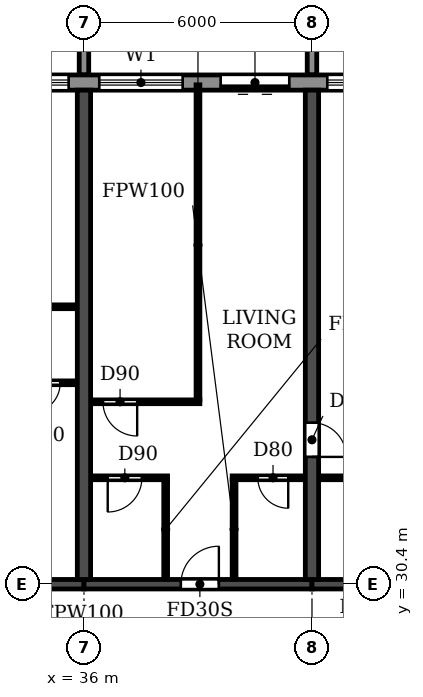
"""IFC4 building model, lengths in metres.
Left out: names, types, materials, properties, quantities, classifications, styles, units other than length and angle.
Written with IfcOpenShell. Run it as: python <this file> out.ifc"""

import sys

from ifc_helpers import new_model, si_unit, direction, frame, frame_2d, origin, place, context, subcontext, project, spatial, polyline, rectangle, outline, extrude, source, transform, mapped, element, fill, save


model = new_model("IFC4")
c1 = context("Model", 3, precision=1e-05, world=origin(), true_north=direction((0.0, 1.0)))
c2 = subcontext(c1, "Body", "Model", "MODEL_VIEW")
j1 = project(units=[si_unit("LENGTHUNIT", "METRE"), si_unit("PLANEANGLEUNIT", "RADIAN")], contexts=[c1])
p1 = place(None, origin())
s1 = spatial("IfcSite", under=j1, at=p1, CompositionType="ELEMENT")
p2 = place(p1, origin())
s2 = spatial("IfcBuilding", under=s1, at=p2, CompositionType="ELEMENT")
p3 = place(p2, frame((0.0, 0.0, 109.2)))
s3 = spatial("IfcBuildingStorey", under=s2, at=p3, CompositionType="ELEMENT", Elevation=109.2)
p4 = place(p3, frame((36.0, 30.525, 0.0), z_axis=(0.0, 0.0, 1.0), x_axis=(0.0, 1.0, 0.0)))
e1 = element("IfcWall", 1, at=p4, inside=s3, PredefinedType="SHEAR", context=c2, shape_type="SweptSolid", body=[
    extrude(rectangle(XDim=12.875, YDim=0.35, at=frame_2d((6.438, 0.0))), origin(), (0.0, 0.0, 1.0), 3.06),
])
p5 = place(p3, frame((42.0, 30.525, 0.0), z_axis=(0.0, 0.0, 1.0), x_axis=(0.0, 1.0, 0.0)))
e2 = element("IfcWall", 2, at=p5, inside=s3, PredefinedType="SHEAR", context=c2, shape_type="SweptSolid", body=[
    extrude(rectangle(XDim=12.875, YDim=0.35, at=frame_2d((6.438, 0.0))), origin(), (0.0, 0.0, 1.0), 3.06),
])
p6 = place(p5, frame((3.225, 0.0, 0.0)))
e3 = element("IfcOpeningElement", 3, at=p6, cuts=e2, PredefinedType="OPENING", context=c2, shape_type="SweptSolid", body=[
    extrude(rectangle(XDim=0.9, YDim=2.1, at=frame_2d((0.45, 1.05))), frame((0.0, 0.185, 0.0), z_axis=(0.0, -1.0, 0.0), x_axis=(1.0, 0.0, 0.0)), (0.0, 0.0, 1.0), 0.37),
])
p7 = place(p3, frame((30.0, 30.4, 0.0), z_axis=(0.0, 0.0, 1.0), x_axis=(1.0, 0.0, 0.0)))
e4 = element("IfcWall", 4, at=p7, inside=s3, PredefinedType="SHEAR", context=c2, shape_type="SweptSolid", body=[
    extrude(rectangle(XDim=6.0, YDim=0.25, at=frame_2d((3.0, 0.0))), origin(), (0.0, 0.0, 1.0), 2.46),
])
p8 = place(p7, frame((2.55, 0.0, 0.0)))
e5 = element("IfcOpeningElement", 5, at=p8, cuts=e4, PredefinedType="OPENING", context=c2, shape_type="SweptSolid", body=[
    extrude(rectangle(XDim=1.0, YDim=2.1, at=frame_2d((0.5, 1.05))), frame((0.0, 0.135, 0.0), z_axis=(0.0, -1.0, 0.0), x_axis=(1.0, 0.0, 0.0)), (0.0, 0.0, 1.0), 0.27),
])
p9 = place(p3, frame((36.0, 30.4, 0.0), z_axis=(0.0, 0.0, 1.0), x_axis=(1.0, 0.0, 0.0)))
e6 = element("IfcWall", 6, at=p9, inside=s3, PredefinedType="SHEAR", context=c2, shape_type="SweptSolid", body=[
    extrude(rectangle(XDim=6.0, YDim=0.25, at=frame_2d((3.0, 0.0))), origin(), (0.0, 0.0, 1.0), 2.46),
])
p10 = place(p9, frame((2.55, 0.0, 0.0)))
e7 = element("IfcOpeningElement", 7, at=p10, cuts=e6, PredefinedType="OPENING", context=c2, shape_type="SweptSolid", body=[
    extrude(rectangle(XDim=1.0, YDim=2.1, at=frame_2d((0.5, 1.05))), frame((0.0, 0.135, 0.0), z_axis=(0.0, -1.0, 0.0), x_axis=(1.0, 0.0, 0.0)), (0.0, 0.0, 1.0), 0.27),
])
p11 = place(p3, frame((42.0, 30.4, 0.0), z_axis=(0.0, 0.0, 1.0), x_axis=(1.0, 0.0, 0.0)))
e8 = element("IfcWall", 8, at=p11, inside=s3, PredefinedType="SHEAR", context=c2, shape_type="SweptSolid", body=[
    extrude(rectangle(XDim=6.0, YDim=0.25, at=frame_2d((3.0, 0.0))), origin(), (0.0, 0.0, 1.0), 2.46),
])
p12 = place(p3, frame((85.317, 43.6, 0.0), z_axis=(0.0, 0.0, 1.0), x_axis=(-1.0, 0.0, 0.0)))
e9 = element("IfcWall", 9, at=p12, inside=s3, PredefinedType="STANDARD", context=c2, shape_type="SweptSolid", body=[
    extrude(rectangle(XDim=68.634, YDim=0.4, at=frame_2d((34.317, 0.0))), origin(), (0.0, 0.0, 1.0), 3.06),
])
p13 = place(p12, frame((64.917, 0.0, 0.0)))
e10 = element("IfcOpeningElement", 10, at=p13, cuts=e9, PredefinedType="OPENING", context=c2, shape_type="SweptSolid", body=[
    extrude(rectangle(XDim=1.8, YDim=2.4, at=frame_2d((0.9, 1.2))), frame((0.0, 0.21, 0.0), z_axis=(0.0, -1.0, 0.0), x_axis=(1.0, 0.0, 0.0)), (0.0, 0.0, 1.0), 0.42),
])
p14 = place(p12, frame((61.717, 0.0, 0.9)))
e11 = element("IfcOpeningElement", 11, at=p14, cuts=e9, PredefinedType="OPENING", context=c2, shape_type="SweptSolid", body=[
    extrude(rectangle(XDim=2.2, YDim=1.5, at=frame_2d((1.1, 0.75))), frame((0.0, 0.21, 0.0), z_axis=(0.0, -1.0, 0.0), x_axis=(1.0, 0.0, 0.0)), (0.0, 0.0, 1.0), 0.42),
])
p15 = place(p12, frame((58.717, 0.0, 0.9)))
e12 = element("IfcOpeningElement", 12, at=p15, cuts=e9, PredefinedType="OPENING", context=c2, shape_type="SweptSolid", body=[
    extrude(rectangle(XDim=2.2, YDim=1.5, at=frame_2d((1.1, 0.75))), frame((0.0, 0.21, 0.0), z_axis=(0.0, -1.0, 0.0), x_axis=(1.0, 0.0, 0.0)), (0.0, 0.0, 1.0), 0.42),
])
p16 = place(p12, frame((55.917, 0.0, 0.0)))
e13 = element("IfcOpeningElement", 13, at=p16, cuts=e9, PredefinedType="OPENING", context=c2, shape_type="SweptSolid", body=[
    extrude(rectangle(XDim=1.8, YDim=2.4, at=frame_2d((0.9, 1.2))), frame((0.0, 0.21, 0.0), z_axis=(0.0, -1.0, 0.0), x_axis=(1.0, 0.0, 0.0)), (0.0, 0.0, 1.0), 0.42),
])
p17 = place(p12, frame((52.917, 0.0, 0.0)))
e14 = element("IfcOpeningElement", 14, at=p17, cuts=e9, PredefinedType="OPENING", context=c2, shape_type="SweptSolid", body=[
    extrude(rectangle(XDim=1.8, YDim=2.4, at=frame_2d((0.9, 1.2))), frame((0.0, 0.21, 0.0), z_axis=(0.0, -1.0, 0.0), x_axis=(1.0, 0.0, 0.0)), (0.0, 0.0, 1.0), 0.42),
])
p18 = place(p12, frame((49.717, 0.0, 0.9)))
e15 = element("IfcOpeningElement", 15, at=p18, cuts=e9, PredefinedType="OPENING", context=c2, shape_type="SweptSolid", body=[
    extrude(rectangle(XDim=2.2, YDim=1.5, at=frame_2d((1.1, 0.75))), frame((0.0, 0.21, 0.0), z_axis=(0.0, -1.0, 0.0), x_axis=(1.0, 0.0, 0.0)), (0.0, 0.0, 1.0), 0.42),
])
p19 = place(p12, frame((46.717, 0.0, 0.9)))
e16 = element("IfcOpeningElement", 16, at=p19, cuts=e9, PredefinedType="OPENING", context=c2, shape_type="SweptSolid", body=[
    extrude(rectangle(XDim=2.2, YDim=1.5, at=frame_2d((1.1, 0.75))), frame((0.0, 0.21, 0.0), z_axis=(0.0, -1.0, 0.0), x_axis=(1.0, 0.0, 0.0)), (0.0, 0.0, 1.0), 0.42),
])
p20 = place(p12, frame((43.917, 0.0, 0.0)))
e17 = element("IfcOpeningElement", 17, at=p20, cuts=e9, PredefinedType="OPENING", context=c2, shape_type="SweptSolid", body=[
    extrude(rectangle(XDim=1.8, YDim=2.4, at=frame_2d((0.9, 1.2))), frame((0.0, 0.21, 0.0), z_axis=(0.0, -1.0, 0.0), x_axis=(1.0, 0.0, 0.0)), (0.0, 0.0, 1.0), 0.42),
])
p21 = place(p12, frame((40.717, 0.0, 0.9)))
e18 = element("IfcOpeningElement", 18, at=p21, cuts=e9, PredefinedType="OPENING", context=c2, shape_type="SweptSolid", body=[
    extrude(rectangle(XDim=2.2, YDim=1.5, at=frame_2d((1.1, 0.75))), frame((0.0, 0.21, 0.0), z_axis=(0.0, -1.0, 0.0), x_axis=(1.0, 0.0, 0.0)), (0.0, 0.0, 1.0), 0.42),
])
p22 = place(p12, frame((37.717, 0.0, 0.9)))
e19 = element("IfcOpeningElement", 19, at=p22, cuts=e9, PredefinedType="OPENING", context=c2, shape_type="SweptSolid", body=[
    extrude(rectangle(XDim=2.2, YDim=1.5, at=frame_2d((1.1, 0.75))), frame((0.0, 0.21, 0.0), z_axis=(0.0, -1.0, 0.0), x_axis=(1.0, 0.0, 0.0)), (0.0, 0.0, 1.0), 0.42),
])
p23 = place(p12, frame((34.917, 0.0, 0.0)))
e20 = element("IfcOpeningElement", 20, at=p23, cuts=e9, PredefinedType="OPENING", context=c2, shape_type="SweptSolid", body=[
    extrude(rectangle(XDim=1.8, YDim=2.4, at=frame_2d((0.9, 1.2))), frame((0.0, 0.21, 0.0), z_axis=(0.0, -1.0, 0.0), x_axis=(1.0, 0.0, 0.0)), (0.0, 0.0, 1.0), 0.42),
])
p24 = place(p12, frame((31.717, 0.0, 0.9)))
e21 = element("IfcOpeningElement", 21, at=p24, cuts=e9, PredefinedType="OPENING", context=c2, shape_type="SweptSolid", body=[
    extrude(rectangle(XDim=2.2, YDim=1.5, at=frame_2d((1.1, 0.75))), frame((0.0, 0.21, 0.0), z_axis=(0.0, -1.0, 0.0), x_axis=(1.0, 0.0, 0.0)), (0.0, 0.0, 1.0), 0.42),
])
p25 = place(p12, frame((28.917, 0.0, 0.0)))
e22 = element("IfcOpeningElement", 22, at=p25, cuts=e9, PredefinedType="OPENING", context=c2, shape_type="SweptSolid", body=[
    extrude(rectangle(XDim=1.8, YDim=2.4, at=frame_2d((0.9, 1.2))), frame((0.0, 0.21, 0.0), z_axis=(0.0, -1.0, 0.0), x_axis=(1.0, 0.0, 0.0)), (0.0, 0.0, 1.0), 0.42),
])
p26 = place(p12, frame((25.717, 0.0, 0.9)))
e23 = element("IfcOpeningElement", 23, at=p26, cuts=e9, PredefinedType="OPENING", context=c2, shape_type="SweptSolid", body=[
    extrude(rectangle(XDim=2.2, YDim=1.5, at=frame_2d((1.1, 0.75))), frame((0.0, 0.21, 0.0), z_axis=(0.0, -1.0, 0.0), x_axis=(1.0, 0.0, 0.0)), (0.0, 0.0, 1.0), 0.42),
])
p27 = place(p12, frame((22.717, 0.0, 0.9)))
e24 = element("IfcOpeningElement", 24, at=p27, cuts=e9, PredefinedType="OPENING", context=c2, shape_type="SweptSolid", body=[
    extrude(rectangle(XDim=2.2, YDim=1.5, at=frame_2d((1.1, 0.75))), frame((0.0, 0.21, 0.0), z_axis=(0.0, -1.0, 0.0), x_axis=(1.0, 0.0, 0.0)), (0.0, 0.0, 1.0), 0.42),
])
p28 = place(p12, frame((19.917, 0.0, 0.0)))
e25 = element("IfcOpeningElement", 25, at=p28, cuts=e9, PredefinedType="OPENING", context=c2, shape_type="SweptSolid", body=[
    extrude(rectangle(XDim=1.8, YDim=2.4, at=frame_2d((0.9, 1.2))), frame((0.0, 0.21, 0.0), z_axis=(0.0, -1.0, 0.0), x_axis=(1.0, 0.0, 0.0)), (0.0, 0.0, 1.0), 0.42),
])
p29 = place(p12, frame((16.717, 0.0, 0.9)))
e26 = element("IfcOpeningElement", 26, at=p29, cuts=e9, PredefinedType="OPENING", context=c2, shape_type="SweptSolid", body=[
    extrude(rectangle(XDim=2.2, YDim=1.5, at=frame_2d((1.1, 0.75))), frame((0.0, 0.21, 0.0), z_axis=(0.0, -1.0, 0.0), x_axis=(1.0, 0.0, 0.0)), (0.0, 0.0, 1.0), 0.42),
])
p30 = place(p12, frame((13.917, 0.0, 0.0)))
e27 = element("IfcOpeningElement", 27, at=p30, cuts=e9, PredefinedType="OPENING", context=c2, shape_type="SweptSolid", body=[
    extrude(rectangle(XDim=1.8, YDim=2.4, at=frame_2d((0.9, 1.2))), frame((0.0, 0.21, 0.0), z_axis=(0.0, -1.0, 0.0), x_axis=(1.0, 0.0, 0.0)), (0.0, 0.0, 1.0), 0.42),
])
p31 = place(p12, frame((10.717, 0.0, 0.9)))
e28 = element("IfcOpeningElement", 28, at=p31, cuts=e9, PredefinedType="OPENING", context=c2, shape_type="SweptSolid", body=[
    extrude(rectangle(XDim=2.2, YDim=1.5, at=frame_2d((1.1, 0.75))), frame((0.0, 0.21, 0.0), z_axis=(0.0, -1.0, 0.0), x_axis=(1.0, 0.0, 0.0)), (0.0, 0.0, 1.0), 0.42),
])
p32 = place(p12, frame((7.717, 0.0, 0.9)))
e29 = element("IfcOpeningElement", 29, at=p32, cuts=e9, PredefinedType="OPENING", context=c2, shape_type="SweptSolid", body=[
    extrude(rectangle(XDim=2.2, YDim=1.5, at=frame_2d((1.1, 0.75))), frame((0.0, 0.21, 0.0), z_axis=(0.0, -1.0, 0.0), x_axis=(1.0, 0.0, 0.0)), (0.0, 0.0, 1.0), 0.42),
])
p33 = place(p12, frame((4.917, 0.0, 0.0)))
e30 = element("IfcOpeningElement", 30, at=p33, cuts=e9, PredefinedType="OPENING", context=c2, shape_type="SweptSolid", body=[
    extrude(rectangle(XDim=1.8, YDim=2.4, at=frame_2d((0.9, 1.2))), frame((0.0, 0.21, 0.0), z_axis=(0.0, -1.0, 0.0), x_axis=(1.0, 0.0, 0.0)), (0.0, 0.0, 1.0), 0.42),
])
p34 = place(p12, frame((1.717, 0.0, 0.9)))
e31 = element("IfcOpeningElement", 31, at=p34, cuts=e9, PredefinedType="OPENING", context=c2, shape_type="SweptSolid", body=[
    extrude(rectangle(XDim=2.2, YDim=1.5, at=frame_2d((1.1, 0.75))), frame((0.0, 0.21, 0.0), z_axis=(0.0, -1.0, 0.0), x_axis=(1.0, 0.0, 0.0)), (0.0, 0.0, 1.0), 0.42),
])
m1 = source(origin(), c2, "Body", "SweptSolid", [
    extrude(outline(polyline([(0.0, 0.0), (0.25, 0.0), (0.25, 3.1), (0.0, 3.1), (0.0, 0.0)])), origin(), (0.0, 0.0, 1.0), 3.1),
])
for number, where in (
    (32, (35.875, 43.8, 0.0)),
    (33, (41.875, 43.8, 0.0)),
):
    element("IfcWall", number, at=place(p3, frame(where)), inside=s3, PredefinedType="STANDARD", context=c2, shape_type="MappedRepresentation", body=[
        mapped(m1, transform((0.0, 0.0, 0.0))),
    ])
p35 = place(p3, frame((36.185, 33.2, 0.0), z_axis=(0.0, 0.0, 1.0), x_axis=(1.0, 0.0, 0.0)))
e34 = element("IfcWall", 34, at=p35, inside=s3, PredefinedType="PARTITIONING", context=c2, shape_type="SweptSolid", body=[
    extrude(rectangle(XDim=2.015, YDim=0.1, at=frame_2d((1.007, 0.0))), origin(), (0.0, 0.0, 1.0), 3.06),
])
p36 = place(p35, frame((0.44, 0.0, 0.0)))
e35 = element("IfcOpeningElement", 35, at=p36, cuts=e34, PredefinedType="OPENING", context=c2, shape_type="SweptSolid", body=[
    extrude(rectangle(XDim=0.9, YDim=2.1, at=frame_2d((0.45, 1.05))), frame((0.0, 0.06, 0.0), z_axis=(0.0, -1.0, 0.0), x_axis=(1.0, 0.0, 0.0)), (0.0, 0.0, 1.0), 0.12),
])
p37 = place(p3, frame((39.9, 33.2, 0.0), z_axis=(0.0, 0.0, 1.0), x_axis=(1.0, 0.0, 0.0)))
e36 = element("IfcWall", 36, at=p37, inside=s3, PredefinedType="PARTITIONING", context=c2, shape_type="SweptSolid", body=[
    extrude(rectangle(XDim=1.915, YDim=0.1, at=frame_2d((0.958, 0.0))), origin(), (0.0, 0.0, 1.0), 3.06),
])
p38 = place(p37, frame((0.675, 0.0, 0.0)))
e37 = element("IfcOpeningElement", 37, at=p38, cuts=e36, PredefinedType="OPENING", context=c2, shape_type="SweptSolid", body=[
    extrude(rectangle(XDim=0.8, YDim=2.1, at=frame_2d((0.4, 1.05))), frame((0.0, 0.06, 0.0), z_axis=(0.0, -1.0, 0.0), x_axis=(1.0, 0.0, 0.0)), (0.0, 0.0, 1.0), 0.12),
])
p39 = place(p3, frame((42.185, 33.2, 0.0), z_axis=(0.0, 0.0, 1.0), x_axis=(1.0, 0.0, 0.0)))
e38 = element("IfcWall", 38, at=p39, inside=s3, PredefinedType="PARTITIONING", context=c2, shape_type="SweptSolid", body=[
    extrude(rectangle(XDim=2.715, YDim=0.1, at=frame_2d((1.357, 0.0))), origin(), (0.0, 0.0, 1.0), 3.06),
])
p40 = place(p39, frame((0.915, 0.0, 0.0)))
e39 = element("IfcOpeningElement", 39, at=p40, cuts=e38, PredefinedType="OPENING", context=c2, shape_type="SweptSolid", body=[
    extrude(rectangle(XDim=0.8, YDim=2.1, at=frame_2d((0.4, 1.05))), frame((0.0, 0.06, 0.0), z_axis=(0.0, -1.0, 0.0), x_axis=(1.0, 0.0, 0.0)), (0.0, 0.0, 1.0), 0.12),
])
p41 = place(p3, frame((36.185, 35.2, 0.0), z_axis=(0.0, 0.0, 1.0), x_axis=(1.0, 0.0, 0.0)))
e40 = element("IfcWall", 40, at=p41, inside=s3, PredefinedType="PARTITIONING", context=c2, shape_type="SweptSolid", body=[
    extrude(rectangle(XDim=2.865, YDim=0.1, at=frame_2d((1.433, 0.0))), origin(), (0.0, 0.0, 1.0), 3.06),
])
p42 = place(p41, frame((0.315, 0.0, 0.0)))
e41 = element("IfcOpeningElement", 41, at=p42, cuts=e40, PredefinedType="OPENING", context=c2, shape_type="SweptSolid", body=[
    extrude(rectangle(XDim=0.9, YDim=2.1, at=frame_2d((0.45, 1.05))), frame((0.0, 0.06, 0.0), z_axis=(0.0, -1.0, 0.0), x_axis=(1.0, 0.0, 0.0)), (0.0, 0.0, 1.0), 0.12),
])
p43 = place(p3, frame((33.9, 35.7, 0.0), z_axis=(0.0, 0.0, 1.0), x_axis=(1.0, 0.0, 0.0)))
e42 = element("IfcWall", 42, at=p43, inside=s3, PredefinedType="PARTITIONING", context=c2, shape_type="SweptSolid", body=[
    extrude(rectangle(XDim=1.915, YDim=0.1, at=frame_2d((0.958, 0.0))), origin(), (0.0, 0.0, 1.0), 3.06),
])
p44 = place(p43, frame((0.675, 0.0, 0.0)))
e43 = element("IfcOpeningElement", 43, at=p44, cuts=e42, PredefinedType="OPENING", context=c2, shape_type="SweptSolid", body=[
    extrude(rectangle(XDim=0.8, YDim=2.1, at=frame_2d((0.4, 1.05))), frame((0.0, 0.06, 0.0), z_axis=(0.0, -1.0, 0.0), x_axis=(1.0, 0.0, 0.0)), (0.0, 0.0, 1.0), 0.12),
])
p45 = place(p3, frame((32.95, 37.7, 0.0), z_axis=(0.0, 0.0, 1.0), x_axis=(1.0, 0.0, 0.0)))
e44 = element("IfcWall", 44, at=p45, inside=s3, PredefinedType="PARTITIONING", context=c2, shape_type="SweptSolid", body=[
    extrude(rectangle(XDim=2.865, YDim=0.1, at=frame_2d((1.433, 0.0))), origin(), (0.0, 0.0, 1.0), 3.06),
])
p46 = place(p45, frame((0.55, 0.0, 0.0)))
e45 = element("IfcOpeningElement", 45, at=p46, cuts=e44, PredefinedType="OPENING", context=c2, shape_type="SweptSolid", body=[
    extrude(rectangle(XDim=0.9, YDim=2.1, at=frame_2d((0.45, 1.05))), frame((0.0, 0.06, 0.0), z_axis=(0.0, -1.0, 0.0), x_axis=(1.0, 0.0, 0.0)), (0.0, 0.0, 1.0), 0.12),
])
p47 = place(p3, frame((38.15, 30.535, 0.0), z_axis=(0.0, 0.0, 1.0), x_axis=(0.0, 1.0, 0.0)))
e46 = element("IfcWall", 46, at=p47, inside=s3, PredefinedType="PARTITIONING", context=c2, shape_type="SweptSolid", body=[
    extrude(rectangle(XDim=2.615, YDim=0.1, at=frame_2d((1.308, 0.0))), origin(), (0.0, 0.0, 1.0), 3.06),
])
p48 = place(p3, frame((39.0, 35.25, 0.0), z_axis=(0.0, 0.0, 1.0), x_axis=(0.0, 1.0, 0.0)))
e47 = element("IfcWall", 47, at=p48, inside=s3, PredefinedType="PARTITIONING", context=c2, shape_type="SweptSolid", body=[
    extrude(rectangle(XDim=8.29, YDim=0.1, at=frame_2d((4.145, 0.0))), origin(), (0.0, 0.0, 1.0), 3.06),
])
p49 = place(p3, frame((39.95, 30.535, 0.0), z_axis=(0.0, 0.0, 1.0), x_axis=(0.0, 1.0, 0.0)))
e48 = element("IfcWall", 48, at=p49, inside=s3, PredefinedType="PARTITIONING", context=c2, shape_type="SweptSolid", body=[
    extrude(rectangle(XDim=2.615, YDim=0.1, at=frame_2d((1.308, 0.0))), origin(), (0.0, 0.0, 1.0), 3.06),
])
p50 = place(p18, origin())
e49 = element("IfcWindow", 49, at=p50, inside=s3, PartitioningType="DOUBLE_PANEL_HORIZONTAL", PredefinedType="WINDOW", context=c2, shape_type="SweptSolid", body=[
    extrude(rectangle(XDim=2.2, YDim=1.5, at=frame_2d((1.1, 0.75))), frame((0.0, 0.03, 0.0), z_axis=(0.0, -1.0, 0.0), x_axis=(1.0, 0.0, 0.0)), (0.0, 0.0, 1.0), 0.06),
])
fill(e15, e49)
p51 = place(p19, origin())
e50 = element("IfcWindow", 50, at=p51, inside=s3, PartitioningType="DOUBLE_PANEL_HORIZONTAL", PredefinedType="WINDOW", context=c2, shape_type="SweptSolid", body=[
    extrude(rectangle(XDim=2.2, YDim=1.5, at=frame_2d((1.1, 0.75))), frame((0.0, 0.03, 0.0), z_axis=(0.0, -1.0, 0.0), x_axis=(1.0, 0.0, 0.0)), (0.0, 0.0, 1.0), 0.06),
])
fill(e16, e50)
p52 = place(p20, origin())
e51 = element("IfcDoor", 51, at=p52, inside=s3, OperationType="DOUBLE_DOOR_SLIDING", PredefinedType="DOOR", context=c2, shape_type="SweptSolid", body=[
    extrude(rectangle(XDim=1.8, YDim=2.4, at=frame_2d((0.9, 1.2))), frame((0.0, 0.025, 0.0), z_axis=(0.0, -1.0, 0.0), x_axis=(1.0, 0.0, 0.0)), (0.0, 0.0, 1.0), 0.05),
])
fill(e17, e51)
p53 = place(p21, origin())
e52 = element("IfcWindow", 52, at=p53, inside=s3, PartitioningType="DOUBLE_PANEL_HORIZONTAL", PredefinedType="WINDOW", context=c2, shape_type="SweptSolid", body=[
    extrude(rectangle(XDim=2.2, YDim=1.5, at=frame_2d((1.1, 0.75))), frame((0.0, 0.03, 0.0), z_axis=(0.0, -1.0, 0.0), x_axis=(1.0, 0.0, 0.0)), (0.0, 0.0, 1.0), 0.06),
])
fill(e18, e52)
p54 = place(p44, frame((0.8, 0.0, 0.0), z_axis=(0.0, 0.0, 1.0), x_axis=(-1.0, 0.0, 0.0)))
e53 = element("IfcDoor", 53, at=p54, inside=s3, OperationType="SINGLE_SWING_RIGHT", PredefinedType="DOOR", context=c2, shape_type="SweptSolid", body=[
    extrude(rectangle(XDim=0.8, YDim=2.1, at=frame_2d((0.4, 1.05))), frame((0.0, 0.025, 0.0), z_axis=(0.0, -1.0, 0.0), x_axis=(1.0, 0.0, 0.0)), (0.0, 0.0, 1.0), 0.05),
])
fill(e43, e53)
p55 = place(p42, frame((0.9, 0.0, 0.0), z_axis=(0.0, 0.0, 1.0), x_axis=(-1.0, 0.0, 0.0)))
e54 = element("IfcDoor", 54, at=p55, inside=s3, OperationType="SINGLE_SWING_LEFT", PredefinedType="DOOR", context=c2, shape_type="SweptSolid", body=[
    extrude(rectangle(XDim=0.9, YDim=2.1, at=frame_2d((0.45, 1.05))), frame((0.0, 0.025, 0.0), z_axis=(0.0, -1.0, 0.0), x_axis=(1.0, 0.0, 0.0)), (0.0, 0.0, 1.0), 0.05),
])
fill(e41, e54)
p56 = place(p36, frame((0.9, 0.0, 0.0), z_axis=(0.0, 0.0, 1.0), x_axis=(-1.0, 0.0, 0.0)))
e55 = element("IfcDoor", 55, at=p56, inside=s3, OperationType="SINGLE_SWING_RIGHT", PredefinedType="DOOR", context=c2, shape_type="SweptSolid", body=[
    extrude(rectangle(XDim=0.9, YDim=2.1, at=frame_2d((0.45, 1.05))), frame((0.0, 0.025, 0.0), z_axis=(0.0, -1.0, 0.0), x_axis=(1.0, 0.0, 0.0)), (0.0, 0.0, 1.0), 0.05),
])
fill(e35, e55)
p57 = place(p10, origin())
e56 = element("IfcDoor", 56, at=p57, inside=s3, OperationType="SINGLE_SWING_RIGHT", PredefinedType="DOOR", context=c2, shape_type="SweptSolid", body=[
    extrude(rectangle(XDim=1.0, YDim=2.1, at=frame_2d((0.5, 1.05))), frame((0.0, 0.025, 0.0), z_axis=(0.0, -1.0, 0.0), x_axis=(1.0, 0.0, 0.0)), (0.0, 0.0, 1.0), 0.05),
])
fill(e7, e56)
p58 = place(p38, frame((0.8, 0.0, 0.0), z_axis=(0.0, 0.0, 1.0), x_axis=(-1.0, 0.0, 0.0)))
e57 = element("IfcDoor", 57, at=p58, inside=s3, OperationType="SINGLE_SWING_LEFT", PredefinedType="DOOR", context=c2, shape_type="SweptSolid", body=[
    extrude(rectangle(XDim=0.8, YDim=2.1, at=frame_2d((0.4, 1.05))), frame((0.0, 0.025, 0.0), z_axis=(0.0, -1.0, 0.0), x_axis=(1.0, 0.0, 0.0)), (0.0, 0.0, 1.0), 0.05),
])
fill(e37, e57)
p59 = place(p6, frame((0.9, 0.0, 0.0), z_axis=(0.0, 0.0, 1.0), x_axis=(-1.0, 0.0, 0.0)))
e58 = element("IfcDoor", 58, at=p59, inside=s3, OperationType="SINGLE_SWING_RIGHT", PredefinedType="DOOR", context=c2, shape_type="SweptSolid", body=[
    extrude(rectangle(XDim=0.9, YDim=2.1, at=frame_2d((0.45, 1.05))), frame((0.0, 0.025, 0.0), z_axis=(0.0, -1.0, 0.0), x_axis=(1.0, 0.0, 0.0)), (0.0, 0.0, 1.0), 0.05),
])
fill(e3, e58)
save(model, sys.argv[1])
